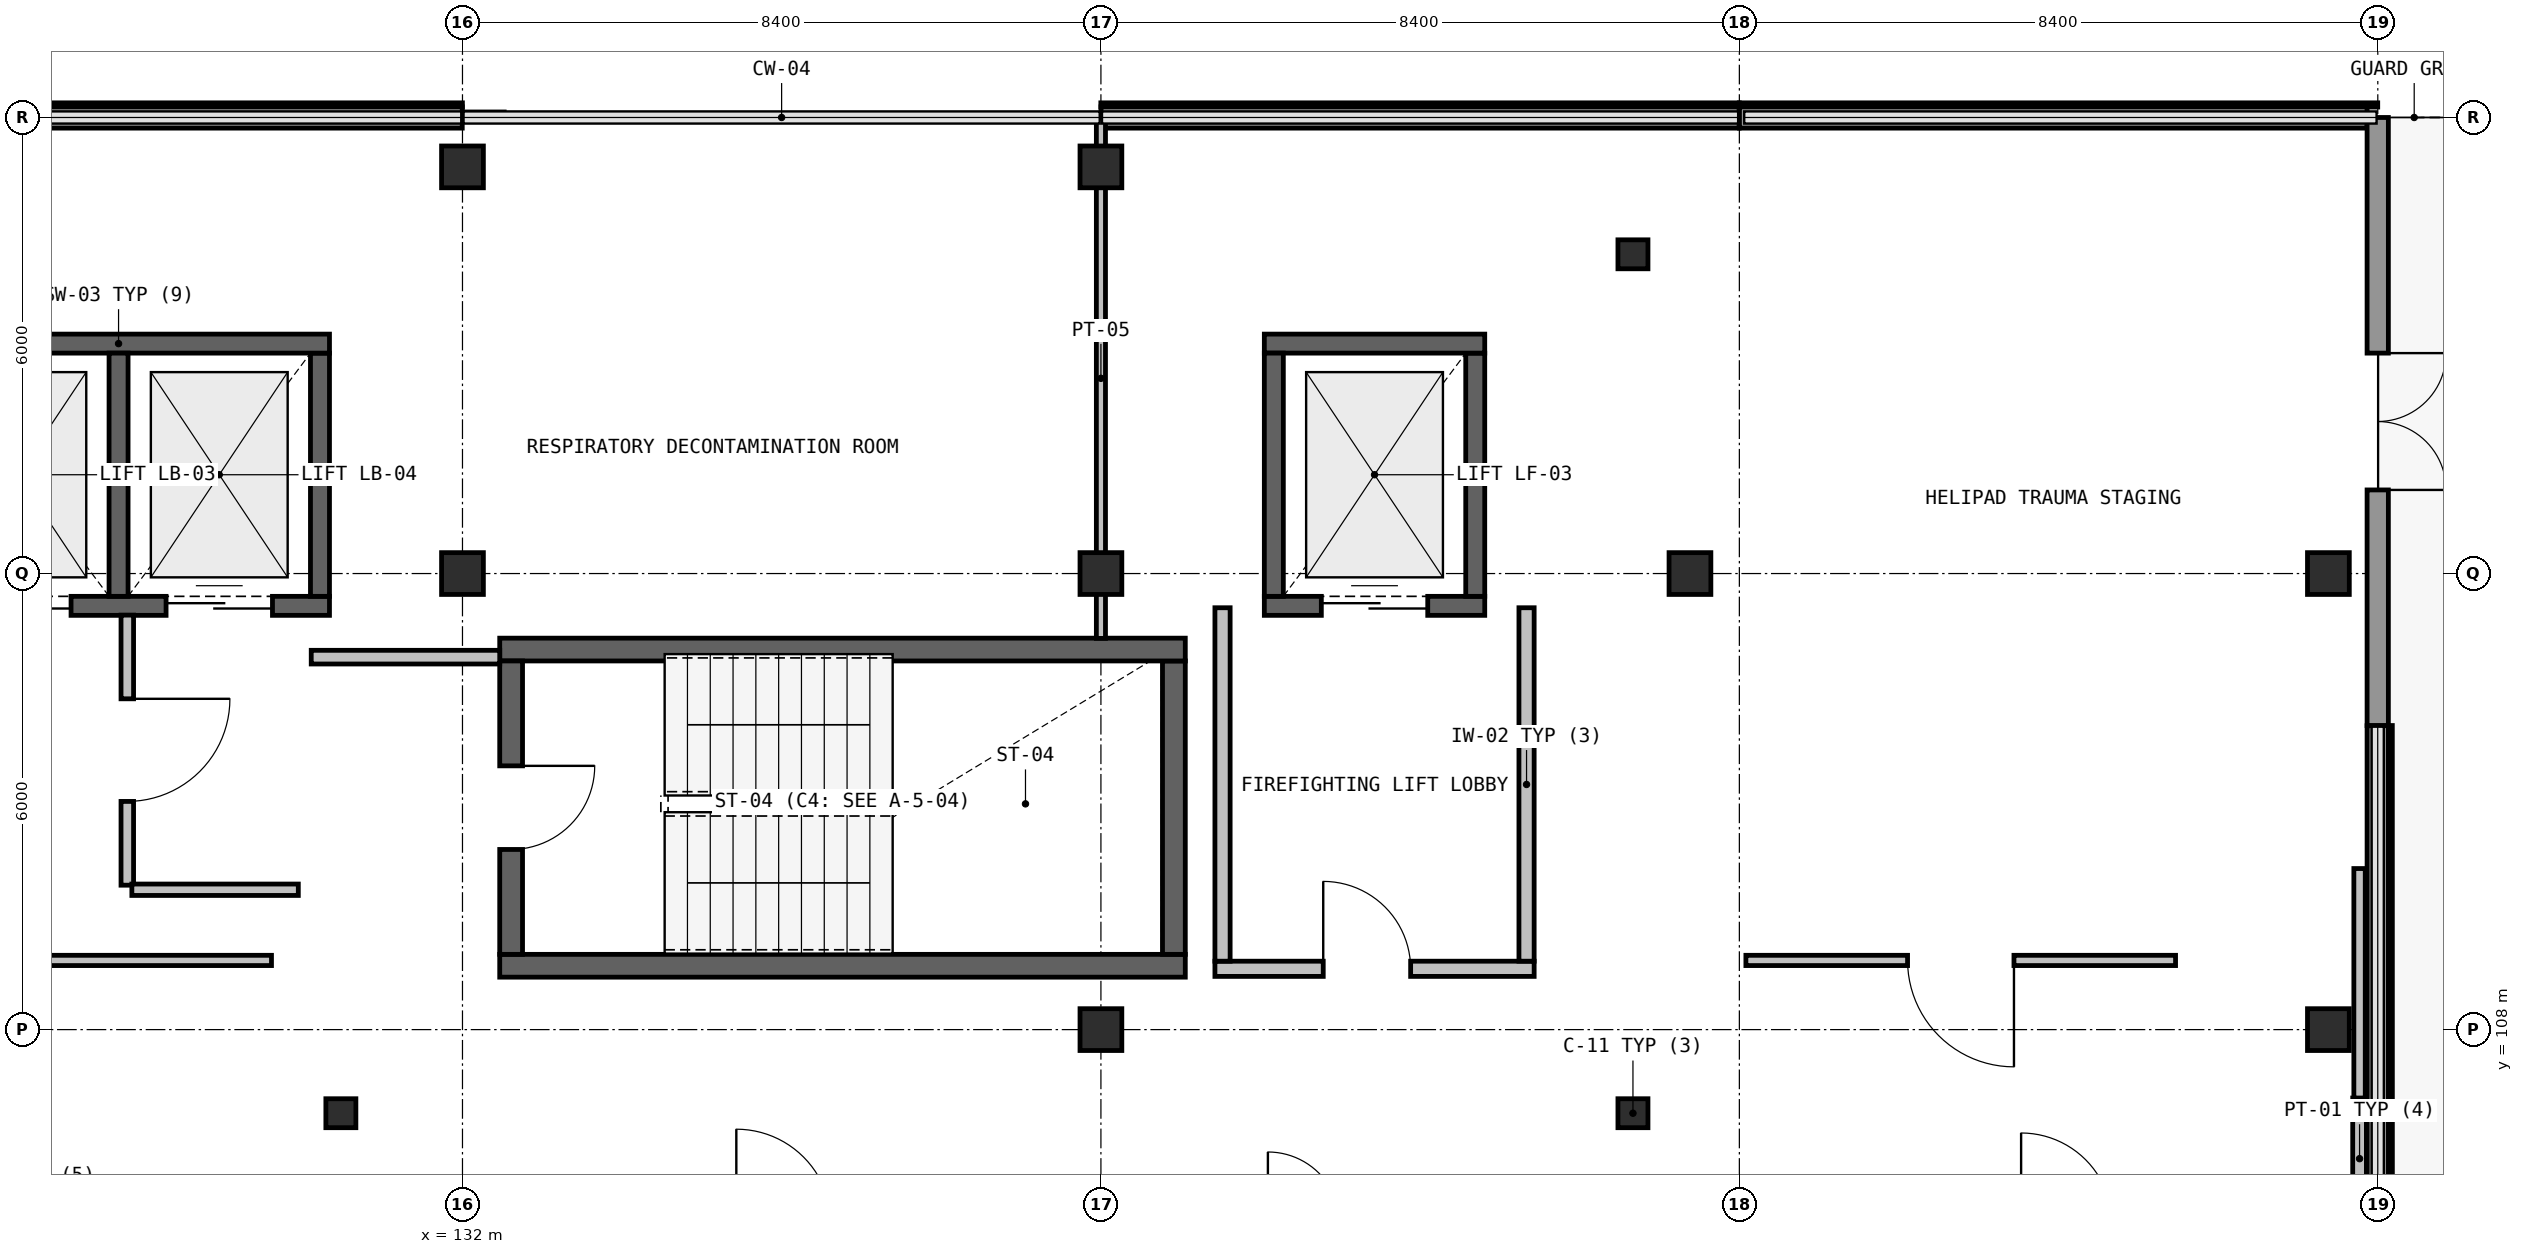
"""IFC4 building model, lengths in metres.
Left out: names, types, materials, properties, quantities, classifications, styles, units other than length and angle.
Written with IfcOpenShell. Run it as: python <this file> out.ifc"""

import sys

from ifc_helpers import new_model, si_unit, direction, frame, frame_2d, origin, origin_2d, place, context, subcontext, project, spatial, rectangle, i_section, extrude, element, fill, save


model = new_model("IFC4")
c1 = context("Model", 3, precision=1e-05, world=origin(), true_north=direction((0.0, 1.0)))
c2 = subcontext(c1, "Body", "Model", "MODEL_VIEW")
j1 = project(units=[si_unit("LENGTHUNIT", "METRE"), si_unit("PLANEANGLEUNIT", "RADIAN")], contexts=[c1])
p1 = place(None, origin())
s1 = spatial("IfcSite", under=j1, at=p1, CompositionType="ELEMENT")
p2 = place(p1, origin())
s2 = spatial("IfcBuilding", under=s1, at=p2, CompositionType="ELEMENT")
p3 = place(p2, frame((0.0, 0.0, 35.4)))
s3 = spatial("IfcBuildingStorey", under=s2, at=p3, CompositionType="ELEMENT", Elevation=35.4)
for number, where, z_axis, x_axis in (
    (1, (130.4, 106.9, 0.0), (0.0, 0.0, 1.0), (1.0, 0.0, 0.0)),
    (2, (147.4, 106.9, 0.0), (0.0, 0.0, 1.0), (1.0, 0.0, 0.0)),
    (3, (147.4, 118.2, 0.0), (0.0, 0.0, 1.0), (1.0, 0.0, 0.0)),
):
    element("IfcColumn", number, at=place(p3, frame(where, z_axis=z_axis, x_axis=x_axis)), inside=s3, PredefinedType="COLUMN", context=c2, shape_type="SweptSolid", body=[
        extrude(i_section(OverallWidth=0.395, OverallDepth=0.381, WebThickness=0.018, FlangeThickness=0.03, at=origin_2d()), origin(), (0.0, 0.0, 1.0), 4.05),
    ])
for number, where, z_axis, x_axis in (
    (4, (132.0, 114.0, 0.0), (0.0, 0.0, 1.0), (1.0, 0.0, 0.0)),
    (5, (132.0, 119.35, 0.0), (0.0, 0.0, 1.0), (1.0, 0.0, 0.0)),
    (6, (140.4, 108.0, 0.0), (0.0, 0.0, 1.0), (1.0, 0.0, 0.0)),
    (7, (140.4, 114.0, 0.0), (0.0, 0.0, 1.0), (1.0, 0.0, 0.0)),
    (8, (140.4, 119.35, 0.0), (0.0, 0.0, 1.0), (1.0, 0.0, 0.0)),
    (9, (148.15, 114.0, 0.0), (0.0, 0.0, 1.0), (1.0, 0.0, 0.0)),
    (10, (156.55, 108.0, 0.0), (0.0, 0.0, 1.0), (1.0, 0.0, 0.0)),
    (11, (156.55, 114.0, 0.0), (0.0, 0.0, 1.0), (1.0, 0.0, 0.0)),
):
    element("IfcColumn", number, at=place(p3, frame(where, z_axis=z_axis, x_axis=x_axis)), inside=s3, PredefinedType="COLUMN", context=c2, shape_type="SweptSolid", body=[
        extrude(rectangle(XDim=0.55, YDim=0.55, at=origin_2d()), origin(), (0.0, 0.0, 1.0), 3.74),
    ])
p4 = place(p3, frame((123.601, 120.0, 0.0), z_axis=(0.0, 0.0, 1.0), x_axis=(1.0, 0.0, 0.0)))
e12 = element("IfcWall", 12, at=p4, inside=s3, PredefinedType="SOLIDWALL", context=c2, shape_type="SweptSolid", body=[
    extrude(rectangle(XDim=8.396, YDim=0.28, at=frame_2d((4.198, 0.0))), origin(), (0.0, 0.0, 1.0), 0.94),
])
p5 = place(p3, frame((140.401, 120.0, 0.0), z_axis=(0.0, 0.0, 1.0), x_axis=(1.0, 0.0, 0.0)))
e13 = element("IfcWall", 13, at=p5, inside=s3, PredefinedType="SOLIDWALL", context=c2, shape_type="SweptSolid", body=[
    extrude(rectangle(XDim=8.396, YDim=0.28, at=frame_2d((4.198, 0.0))), origin(), (0.0, 0.0, 1.0), 0.94),
])
p6 = place(p3, frame((148.801, 120.0, 0.0), z_axis=(0.0, 0.0, 1.0), x_axis=(1.0, 0.0, 0.0)))
e14 = element("IfcWall", 14, at=p6, inside=s3, PredefinedType="SOLIDWALL", context=c2, shape_type="SweptSolid", body=[
    extrude(rectangle(XDim=8.258, YDim=0.28, at=frame_2d((4.129, 0.0))), origin(), (0.0, 0.0, 1.0), 0.94),
])
p7 = place(p3, frame((157.199, 120.0, 0.0), z_axis=(0.0, 0.0, 1.0), x_axis=(0.0, -1.0, 0.0)))
e15 = element("IfcWall", 15, at=p7, inside=s3, PredefinedType="SOLIDWALL", context=c2, shape_type="SweptSolid", body=[
    extrude(rectangle(XDim=8.0, YDim=0.28, at=frame_2d((4.0, 0.0))), origin(), (0.0, 0.0, 1.0), 3.74),
])
p8 = place(p7, frame((3.1, 0.0, 0.0)))
e16 = element("IfcOpeningElement", 16, at=p8, cuts=e15, PredefinedType="OPENING", context=c2, shape_type="SweptSolid", body=[
    extrude(rectangle(XDim=1.8, YDim=2.2, at=frame_2d((0.9, 1.1))), frame((0.0, 0.15, 0.0), z_axis=(0.0, -1.0, 0.0), x_axis=(1.0, 0.0, 0.0)), (0.0, 0.0, 1.0), 0.3),
])
p9 = place(p3, frame((157.199, 111.998, 0.0), z_axis=(0.0, 0.0, 1.0), x_axis=(0.000122144863, -0.99999999254, 0.0)))
e17 = element("IfcWall", 17, at=p9, inside=s3, PredefinedType="SOLIDWALL", context=c2, shape_type="SweptSolid", body=[
    extrude(rectangle(XDim=7.995, YDim=0.28, at=frame_2d((3.998, 0.0))), origin(), (0.0, 0.0, 1.0), 0.94),
])
p10 = place(p3, frame((132.49, 108.84, 0.0), z_axis=(0.0, 0.0, 1.0), x_axis=(1.0, 0.0, 0.0)))
e18 = element("IfcWall", 18, at=p10, inside=s3, PredefinedType="SHEAR", context=c2, shape_type="SweptSolid", body=[
    extrude(rectangle(XDim=9.02, YDim=0.3, at=frame_2d((4.51, 0.0))), origin(), (0.0, 0.0, 1.0), 3.74),
])
p11 = place(p3, frame((141.36, 108.99, 0.0), z_axis=(0.0, 0.0, 1.0), x_axis=(0.0, 1.0, 0.0)))
e19 = element("IfcWall", 19, at=p11, inside=s3, PredefinedType="SHEAR", context=c2, shape_type="SweptSolid", body=[
    extrude(rectangle(XDim=3.86, YDim=0.3, at=frame_2d((1.93, 0.0))), origin(), (0.0, 0.0, 1.0), 3.74),
])
p12 = place(p3, frame((141.51, 113.0, 0.0), z_axis=(0.0, 0.0, 1.0), x_axis=(-1.0, 0.0, 0.0)))
e20 = element("IfcWall", 20, at=p12, inside=s3, PredefinedType="SHEAR", context=c2, shape_type="SweptSolid", body=[
    extrude(rectangle(XDim=9.02, YDim=0.3, at=frame_2d((4.51, 0.0))), origin(), (0.0, 0.0, 1.0), 3.74),
])
p13 = place(p3, frame((132.64, 112.85, 0.0), z_axis=(0.0, 0.0, 1.0), x_axis=(0.0, -1.0, 0.0)))
e21 = element("IfcWall", 21, at=p13, inside=s3, PredefinedType="SHEAR", context=c2, shape_type="SweptSolid", body=[
    extrude(rectangle(XDim=3.86, YDim=0.3, at=frame_2d((1.93, 0.0))), origin(), (0.0, 0.0, 1.0), 3.74),
])
p14 = place(p13, frame((1.38, 0.0, 0.0)))
e22 = element("IfcOpeningElement", 22, at=p14, cuts=e21, PredefinedType="OPENING", context=c2, shape_type="SweptSolid", body=[
    extrude(rectangle(XDim=1.1, YDim=2.15, at=frame_2d((0.55, 1.075))), frame((0.0, 0.16, 0.0), z_axis=(0.0, -1.0, 0.0), x_axis=(1.0, 0.0, 0.0)), (0.0, 0.0, 1.0), 0.32),
])
p15 = place(p3, frame((141.9, 108.8, 0.0), z_axis=(0.0, 0.0, 1.0), x_axis=(1.0, 0.0, 0.0)))
e23 = element("IfcWall", 23, at=p15, inside=s3, PredefinedType="SOLIDWALL", context=c2, shape_type="SweptSolid", body=[
    extrude(rectangle(XDim=4.2, YDim=0.2, at=frame_2d((2.1, 0.0))), origin(), (0.0, 0.0, 1.0), 3.74),
])
p16 = place(p15, frame((1.425, 0.0, 0.0)))
e24 = element("IfcOpeningElement", 24, at=p16, cuts=e23, PredefinedType="OPENING", context=c2, shape_type="SweptSolid", body=[
    extrude(rectangle(XDim=1.15, YDim=2.15, at=frame_2d((0.575, 1.075))), frame((0.0, 0.11, 0.0), z_axis=(0.0, -1.0, 0.0), x_axis=(1.0, 0.0, 0.0)), (0.0, 0.0, 1.0), 0.22),
])
for number, where, z_axis, x_axis in (
    (25, (146.0, 108.9, 0.0), (0.0, 0.0, 1.0), (0.0, 1.0, 0.0)),
    (26, (142.0, 113.55, 0.0), (0.0, 0.0, 1.0), (0.0, -1.0, 0.0)),
):
    element("IfcWall", number, at=place(p3, frame(where, z_axis=z_axis, x_axis=x_axis)), inside=s3, PredefinedType="SOLIDWALL", context=c2, shape_type="SweptSolid", body=[
        extrude(rectangle(XDim=4.65, YDim=0.2, at=frame_2d((2.325, 0.0))), origin(), (0.0, 0.0, 1.0), 3.74),
    ])
p17 = place(p3, frame((124.7, 113.575, 0.0), z_axis=(0.0, 0.0, 1.0), x_axis=(1.0, 0.0, 0.0)))
e27 = element("IfcWall", 27, at=p17, inside=s3, PredefinedType="SHEAR", context=c2, shape_type="SweptSolid", body=[
    extrude(rectangle(XDim=5.55, YDim=0.25, at=frame_2d((2.775, 0.0))), origin(), (0.0, 0.0, 1.0), 3.74),
])
p18 = place(p17, frame((0.75, 0.0, 0.0)))
e28 = element("IfcOpeningElement", 28, at=p18, cuts=e27, PredefinedType="OPENING", context=c2, shape_type="SweptSolid", body=[
    extrude(rectangle(XDim=1.4, YDim=2.2, at=frame_2d((0.7, 1.1))), frame((0.0, 0.135, 0.0), z_axis=(0.0, -1.0, 0.0), x_axis=(1.0, 0.0, 0.0)), (0.0, 0.0, 1.0), 0.27),
])
p19 = place(p17, frame((3.4, 0.0, 0.0)))
e29 = element("IfcOpeningElement", 29, at=p19, cuts=e27, PredefinedType="OPENING", context=c2, shape_type="SweptSolid", body=[
    extrude(rectangle(XDim=1.4, YDim=2.2, at=frame_2d((0.7, 1.1))), frame((0.0, 0.135, 0.0), z_axis=(0.0, -1.0, 0.0), x_axis=(1.0, 0.0, 0.0)), (0.0, 0.0, 1.0), 0.27),
])
p20 = place(p3, frame((130.125, 113.7, 0.0), z_axis=(0.0, 0.0, 1.0), x_axis=(0.0, 1.0, 0.0)))
e30 = element("IfcWall", 30, at=p20, inside=s3, PredefinedType="SHEAR", context=c2, shape_type="SweptSolid", body=[
    extrude(rectangle(XDim=3.2, YDim=0.25, at=frame_2d((1.6, 0.0))), origin(), (0.0, 0.0, 1.0), 3.74),
])
p21 = place(p3, frame((130.25, 117.025, 0.0), z_axis=(0.0, 0.0, 1.0), x_axis=(-1.0, 0.0, 0.0)))
e31 = element("IfcWall", 31, at=p21, inside=s3, PredefinedType="SHEAR", context=c2, shape_type="SweptSolid", body=[
    extrude(rectangle(XDim=5.55, YDim=0.25, at=frame_2d((2.775, 0.0))), origin(), (0.0, 0.0, 1.0), 3.74),
])
p22 = place(p3, frame((127.475, 113.7, 0.0), z_axis=(0.0, 0.0, 1.0), x_axis=(0.0, 1.0, 0.0)))
e32 = element("IfcWall", 32, at=p22, inside=s3, PredefinedType="SHEAR", context=c2, shape_type="SweptSolid", body=[
    extrude(rectangle(XDim=3.2, YDim=0.25, at=frame_2d((1.6, 0.0))), origin(), (0.0, 0.0, 1.0), 3.74),
])
p23 = place(p3, frame((142.55, 113.575, 0.0), z_axis=(0.0, 0.0, 1.0), x_axis=(1.0, 0.0, 0.0)))
e33 = element("IfcWall", 33, at=p23, inside=s3, PredefinedType="SHEAR", context=c2, shape_type="SweptSolid", body=[
    extrude(rectangle(XDim=2.9, YDim=0.25, at=frame_2d((1.45, 0.0))), origin(), (0.0, 0.0, 1.0), 3.74),
])
p24 = place(p23, frame((0.75, 0.0, 0.0)))
e34 = element("IfcOpeningElement", 34, at=p24, cuts=e33, PredefinedType="OPENING", context=c2, shape_type="SweptSolid", body=[
    extrude(rectangle(XDim=1.4, YDim=2.15, at=frame_2d((0.7, 1.075))), frame((0.0, 0.135, 0.0), z_axis=(0.0, -1.0, 0.0), x_axis=(1.0, 0.0, 0.0)), (0.0, 0.0, 1.0), 0.27),
])
p25 = place(p3, frame((145.325, 113.7, 0.0), z_axis=(0.0, 0.0, 1.0), x_axis=(0.0, 1.0, 0.0)))
e35 = element("IfcWall", 35, at=p25, inside=s3, PredefinedType="SHEAR", context=c2, shape_type="SweptSolid", body=[
    extrude(rectangle(XDim=3.2, YDim=0.25, at=frame_2d((1.6, 0.0))), origin(), (0.0, 0.0, 1.0), 3.74),
])
p26 = place(p3, frame((145.45, 117.025, 0.0), z_axis=(0.0, 0.0, 1.0), x_axis=(-1.0, 0.0, 0.0)))
e36 = element("IfcWall", 36, at=p26, inside=s3, PredefinedType="SHEAR", context=c2, shape_type="SweptSolid", body=[
    extrude(rectangle(XDim=2.9, YDim=0.25, at=frame_2d((1.45, 0.0))), origin(), (0.0, 0.0, 1.0), 3.74),
])
p27 = place(p3, frame((142.675, 116.9, 0.0), z_axis=(0.0, 0.0, 1.0), x_axis=(0.0, -1.0, 0.0)))
e37 = element("IfcWall", 37, at=p27, inside=s3, PredefinedType="SHEAR", context=c2, shape_type="SweptSolid", body=[
    extrude(rectangle(XDim=3.2, YDim=0.25, at=frame_2d((1.6, 0.0))), origin(), (0.0, 0.0, 1.0), 3.74),
])
p28 = place(p3, frame((156.96, 105.504, 0.0), z_axis=(0.0, 0.0, 1.0), x_axis=(0.0, 1.0, 0.0)))
e38 = element("IfcWall", 38, at=p28, inside=s3, PredefinedType="PARTITIONING", context=c2, shape_type="SweptSolid", body=[
    extrude(rectangle(XDim=1.596, YDim=0.18, at=frame_2d((0.798, 0.0))), origin(), (0.0, 0.0, 1.0), 3.74),
])
p29 = place(p3, frame((140.4, 119.99, 0.0), z_axis=(0.0, 0.0, 1.0), x_axis=(0.0, -1.0, 0.0)))
e39 = element("IfcWall", 39, at=p29, inside=s3, PredefinedType="PARTITIONING", context=c2, shape_type="SweptSolid", body=[
    extrude(rectangle(XDim=6.843, YDim=0.12, at=frame_2d((3.421, 0.0))), origin(), (0.0, 0.0, 1.0), 3.14),
])
p30 = place(p3, frame((132.49, 112.9, 0.0), z_axis=(0.0, 0.0, 1.0), x_axis=(-1.0, 0.0, 0.0)))
e40 = element("IfcWall", 40, at=p30, inside=s3, PredefinedType="PARTITIONING", context=c2, shape_type="SweptSolid", body=[
    extrude(rectangle(XDim=2.48, YDim=0.18, at=frame_2d((1.24, 0.0))), origin(), (0.0, 0.0, 1.0), 3.74),
])
p31 = place(p3, frame((127.59, 113.453, 0.0), z_axis=(0.0, 0.0, 1.0), x_axis=(0.0, -1.0, 0.0)))
e41 = element("IfcWall", 41, at=p31, inside=s3, PredefinedType="PARTITIONING", context=c2, shape_type="SweptSolid", body=[
    extrude(rectangle(XDim=3.553, YDim=0.165, at=frame_2d((1.776, 0.0))), origin(), (0.0, 0.0, 1.0), 3.74),
])
p32 = place(p31, frame((1.101, 0.0, 0.0)))
e42 = element("IfcOpeningElement", 42, at=p32, cuts=e41, PredefinedType="OPENING", context=c2, shape_type="SweptSolid", body=[
    extrude(rectangle(XDim=1.35, YDim=2.15, at=frame_2d((0.675, 1.075))), frame((0.0, 0.093, 0.0), z_axis=(0.0, -1.0, 0.0), x_axis=(1.0, 0.0, 0.0)), (0.0, 0.0, 1.0), 0.185),
])
p33 = place(p3, frame((127.65, 109.84, 0.0), z_axis=(0.0, 0.0, 1.0), x_axis=(1.0, 0.0, 0.0)))
e43 = element("IfcWall", 43, at=p33, inside=s3, PredefinedType="PARTITIONING", context=c2, shape_type="SweptSolid", body=[
    extrude(rectangle(XDim=2.19, YDim=0.15, at=frame_2d((1.095, 0.0))), origin(), (0.0, 0.0, 1.0), 3.74),
])
p34 = place(p3, frame((129.487, 108.91, 0.0), z_axis=(0.0, 0.0, 1.0), x_axis=(-1.0, 0.0, 0.0)))
e44 = element("IfcWall", 44, at=p34, inside=s3, PredefinedType="PARTITIONING", context=c2, shape_type="SweptSolid", body=[
    extrude(rectangle(XDim=3.876, YDim=0.135, at=frame_2d((1.938, 0.0))), origin(), (0.0, 0.0, 1.0), 3.74),
])
p35 = place(p3, frame((156.96, 107.1, 0.0), z_axis=(0.0, 0.0, 1.0), x_axis=(0.0, 1.0, 0.0)))
e45 = element("IfcWall", 45, at=p35, inside=s3, PredefinedType="PARTITIONING", context=c2, shape_type="SweptSolid", body=[
    extrude(rectangle(XDim=3.019, YDim=0.15, at=frame_2d((1.509, 0.0))), origin(), (0.0, 0.0, 1.0), 3.74),
])
p36 = place(p3, frame((154.539, 108.91, 0.0), z_axis=(0.0, 0.0, 1.0), x_axis=(-1.0, 0.0, 0.0)))
e46 = element("IfcWall", 46, at=p36, inside=s3, PredefinedType="PARTITIONING", context=c2, shape_type="SweptSolid", body=[
    extrude(rectangle(XDim=5.653, YDim=0.135, at=frame_2d((2.827, 0.0))), origin(), (0.0, 0.0, 1.0), 3.74),
])
p37 = place(p36, frame((2.126, 0.0, 0.0)))
e47 = element("IfcOpeningElement", 47, at=p37, cuts=e46, PredefinedType="OPENING", context=c2, shape_type="SweptSolid", body=[
    extrude(rectangle(XDim=1.4, YDim=2.15, at=frame_2d((0.7, 1.075))), frame((0.0, 0.077, 0.0), z_axis=(0.0, -1.0, 0.0), x_axis=(1.0, 0.0, 0.0)), (0.0, 0.0, 1.0), 0.155),
])
p38 = place(p8, origin())
e48 = element("IfcDoor", 48, at=p38, inside=s3, OperationType="DOUBLE_DOOR_SINGLE_SWING", PredefinedType="DOOR", context=c2, shape_type="SweptSolid", body=[
    extrude(rectangle(XDim=1.8, YDim=2.2, at=frame_2d((0.9, 1.1))), frame((0.0, 0.025, 0.0), z_axis=(0.0, -1.0, 0.0), x_axis=(1.0, 0.0, 0.0)), (0.0, 0.0, 1.0), 0.05),
])
fill(e16, e48)
p39 = place(p14, origin())
e49 = element("IfcDoor", 49, at=p39, inside=s3, OperationType="SINGLE_SWING_LEFT", PredefinedType="DOOR", context=c2, shape_type="SweptSolid", body=[
    extrude(rectangle(XDim=1.1, YDim=2.15, at=frame_2d((0.55, 1.075))), frame((0.0, 0.025, 0.0), z_axis=(0.0, -1.0, 0.0), x_axis=(1.0, 0.0, 0.0)), (0.0, 0.0, 1.0), 0.05),
])
fill(e22, e49)
p40 = place(p16, origin())
e50 = element("IfcDoor", 50, at=p40, inside=s3, OperationType="SINGLE_SWING_RIGHT", PredefinedType="DOOR", context=c2, shape_type="SweptSolid", body=[
    extrude(rectangle(XDim=1.15, YDim=2.15, at=frame_2d((0.575, 1.075))), frame((0.0, 0.025, 0.0), z_axis=(0.0, -1.0, 0.0), x_axis=(1.0, 0.0, 0.0)), (0.0, 0.0, 1.0), 0.05),
])
fill(e24, e50)
p41 = place(p18, origin())
e51 = element("IfcDoor", 51, at=p41, inside=s3, OperationType="DOUBLE_DOOR_SLIDING", PredefinedType="DOOR", context=c2, shape_type="SweptSolid", body=[
    extrude(rectangle(XDim=1.4, YDim=2.2, at=frame_2d((0.7, 1.1))), frame((0.0, 0.025, 0.0), z_axis=(0.0, -1.0, 0.0), x_axis=(1.0, 0.0, 0.0)), (0.0, 0.0, 1.0), 0.05),
])
fill(e28, e51)
p42 = place(p19, origin())
e52 = element("IfcDoor", 52, at=p42, inside=s3, OperationType="DOUBLE_DOOR_SLIDING", PredefinedType="DOOR", context=c2, shape_type="SweptSolid", body=[
    extrude(rectangle(XDim=1.4, YDim=2.2, at=frame_2d((0.7, 1.1))), frame((0.0, 0.025, 0.0), z_axis=(0.0, -1.0, 0.0), x_axis=(1.0, 0.0, 0.0)), (0.0, 0.0, 1.0), 0.05),
])
fill(e29, e52)
p43 = place(p24, origin())
e53 = element("IfcDoor", 53, at=p43, inside=s3, OperationType="DOUBLE_DOOR_SLIDING", PredefinedType="DOOR", context=c2, shape_type="SweptSolid", body=[
    extrude(rectangle(XDim=1.4, YDim=2.15, at=frame_2d((0.7, 1.075))), frame((0.0, 0.025, 0.0), z_axis=(0.0, -1.0, 0.0), x_axis=(1.0, 0.0, 0.0)), (0.0, 0.0, 1.0), 0.05),
])
fill(e34, e53)
p44 = place(p32, origin())
e54 = element("IfcDoor", 54, at=p44, inside=s3, OperationType="SINGLE_SWING_RIGHT", PredefinedType="DOOR", context=c2, shape_type="SweptSolid", body=[
    extrude(rectangle(XDim=1.35, YDim=2.15, at=frame_2d((0.675, 1.075))), frame((0.0, 0.025, 0.0), z_axis=(0.0, -1.0, 0.0), x_axis=(1.0, 0.0, 0.0)), (0.0, 0.0, 1.0), 0.05),
])
fill(e42, e54)
p45 = place(p37, origin())
e55 = element("IfcDoor", 55, at=p45, inside=s3, OperationType="SINGLE_SWING_LEFT", PredefinedType="DOOR", context=c2, shape_type="SweptSolid", body=[
    extrude(rectangle(XDim=1.4, YDim=2.15, at=frame_2d((0.7, 1.075))), frame((0.0, 0.025, 0.0), z_axis=(0.0, -1.0, 0.0), x_axis=(1.0, 0.0, 0.0)), (0.0, 0.0, 1.0), 0.05),
])
fill(e47, e55)
save(model, sys.argv[1])
